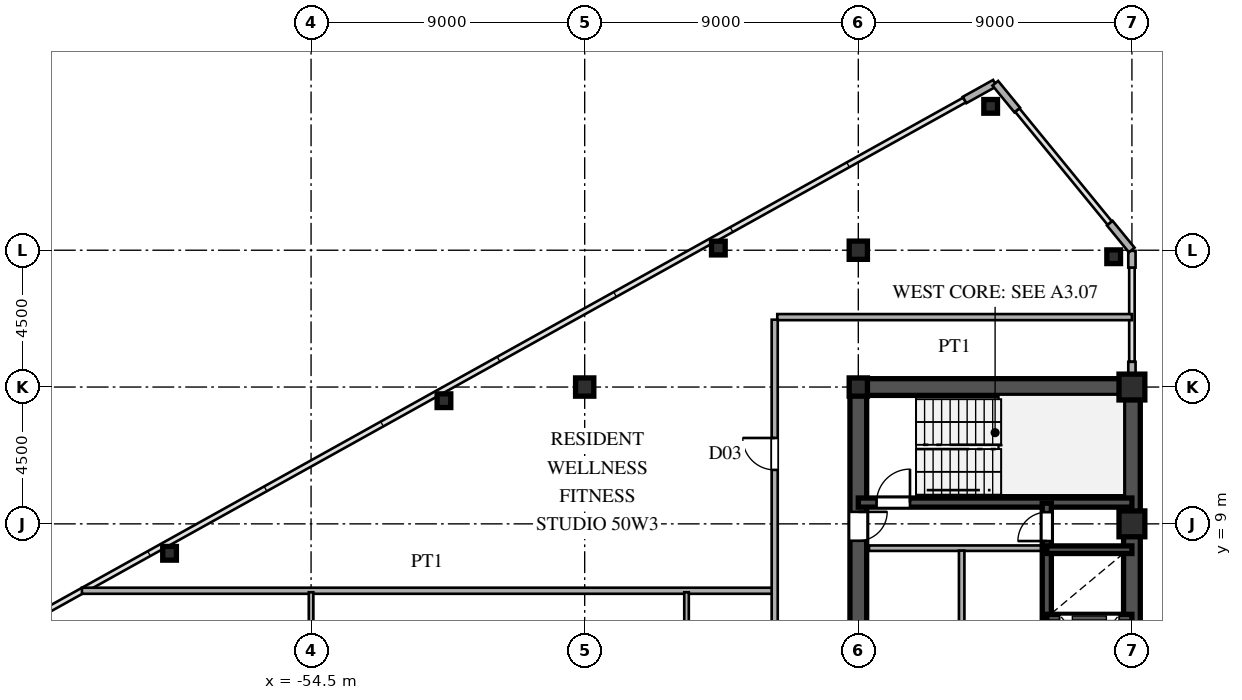
"""IFC4 building model, lengths in metres.
Left out: names, types, materials, properties, quantities, classifications, styles, units other than length and angle.
Written with IfcOpenShell. Run it as: python <this file> out.ifc"""

import sys

from ifc_helpers import new_model, si_unit, direction, frame, frame_2d, origin, origin_2d, place, context, subcontext, project, spatial, rectangle, hollow_rectangle, i_section, extrude, source, transform, mapped, element, fill, save


model = new_model("IFC4")
c1 = context("Model", 3, precision=1e-05, world=origin(), true_north=direction((0.0, 1.0)))
c2 = subcontext(c1, "Body", "Model", "MODEL_VIEW")
j1 = project(units=[si_unit("LENGTHUNIT", "METRE"), si_unit("PLANEANGLEUNIT", "RADIAN")], contexts=[c1])
p1 = place(None, origin())
s1 = spatial("IfcSite", under=j1, at=p1, CompositionType="ELEMENT")
p2 = place(p1, origin())
s2 = spatial("IfcBuilding", under=s1, at=p2, CompositionType="ELEMENT")
p3 = place(p2, frame((0.0, 0.0, 188.7)))
s3 = spatial("IfcBuildingStorey", under=s2, at=p3, CompositionType="ELEMENT", Elevation=188.7)
m1 = source(origin(), c2, "Body", "SweptSolid", [
    extrude(hollow_rectangle(XDim=0.85, YDim=0.85, WallThickness=0.036, at=origin_2d()), origin(), (0.0, 0.0, 1.0), 3.6),
])
for number, where, z_axis, x_axis in (
    (1, (-27.5, 9.0, 0.0), (0.0, 0.0, 1.0), (1.0, 0.0, 0.0)),
    (2, (-27.5, 13.5, 0.0), (0.0, 0.0, 1.0), (1.0, 0.0, 0.0)),
):
    element("IfcColumn", number, at=place(p3, frame(where, z_axis=z_axis, x_axis=x_axis)), inside=s3, PredefinedType="COLUMN", context=c2, shape_type="MappedRepresentation", body=[
        mapped(m1, transform((0.0, 0.0, 0.0), scale=1.0)),
    ])
m2 = source(origin(), c2, "Body", "SweptSolid", [
    extrude(i_section(OverallWidth=0.6, OverallDepth=0.6, WebThickness=0.025, FlangeThickness=0.04, at=origin_2d()), origin(), (0.0, 0.0, 1.0), 3.6),
])
for number, where, z_axis, x_axis in (
    (3, (-36.5, 13.5, 0.0), (0.0, 0.0, 1.0), (1.0, 0.0, 0.0)),
    (4, (-36.5, 18.0, 0.0), (0.0, 0.0, 1.0), (1.0, 0.0, 0.0)),
    (5, (-45.5, 13.5, 0.0), (0.0, 0.0, 1.0), (1.0, 0.0, 0.0)),
):
    element("IfcColumn", number, at=place(p3, frame(where, z_axis=z_axis, x_axis=x_axis)), inside=s3, PredefinedType="COLUMN", context=c2, shape_type="MappedRepresentation", body=[
        mapped(m2, transform((0.0, 0.0, 0.0), scale=1.0)),
    ])
m3 = source(origin(), c2, "Body", "SweptSolid", [
    extrude(hollow_rectangle(XDim=0.45, YDim=0.45, WallThickness=0.018, at=origin_2d()), origin(), (0.0, 0.0, 1.0), 3.6),
])
for number, where, z_axis, x_axis in (
    (6, (-28.1, 17.786, 0.0), (0.0, 0.0, 1.0), (1.0, 0.0, 0.0)),
    (7, (-32.147, 22.732, 0.0), (0.0, 0.0, 1.0), (1.0, 0.0, 0.0)),
    (8, (-41.104, 18.071, 0.0), (0.0, 0.0, 1.0), (1.0, 0.0, 0.0)),
    (9, (-50.129, 13.051, 0.0), (0.0, 0.0, 1.0), (1.0, 0.0, 0.0)),
    (10, (-59.155, 8.031, 0.0), (0.0, 0.0, 1.0), (1.0, 0.0, 0.0)),
):
    element("IfcColumn", number, at=place(p3, frame(where, z_axis=z_axis, x_axis=x_axis)), inside=s3, PredefinedType="COLUMN", context=c2, shape_type="MappedRepresentation", body=[
        mapped(m3, transform((0.0, 0.0, 0.0), scale=1.0)),
    ])
p4 = place(p3, frame((-27.5, 13.78, 0.0), z_axis=(0.0, 0.0, 1.0), x_axis=(0.0, 1.0, 0.0)))
e11 = element("IfcWall", 11, at=p4, inside=s3, PredefinedType="SOLIDWALL", context=c2, shape_type="SweptSolid", body=[
    extrude(rectangle(XDim=0.55, YDim=0.24, at=frame_2d((0.275, 0.0))), origin(), (0.0, 0.0, 1.0), 2.88),
])
p5 = place(p3, frame((-27.5, 17.43, 0.0), z_axis=(0.0, 0.0, 1.0), x_axis=(0.0, 1.0, 0.0)))
e12 = element("IfcWall", 12, at=p5, inside=s3, PredefinedType="SOLIDWALL", context=c2, shape_type="SweptSolid", body=[
    extrude(rectangle(XDim=0.55, YDim=0.24, at=frame_2d((0.275, 0.0))), origin(), (0.0, 0.0, 1.0), 3.38),
])
for number, where, z_axis, x_axis in (
    (13, (-27.506, 18.008, 0.0), (0.0, 0.0, 1.0), (-0.633, 0.774, 0.0)),
    (14, (-31.272, 22.61, 0.0), (0.0, 0.0, 1.0), (-0.633, 0.774, 0.0)),
):
    element("IfcWall", number, at=place(p3, frame(where, z_axis=z_axis, x_axis=x_axis)), inside=s3, PredefinedType="SOLIDWALL", context=c2, shape_type="SweptSolid", body=[
        extrude(rectangle(XDim=1.14, YDim=0.24, at=frame_2d((0.57, 0.0))), origin(), (0.0, 0.0, 1.0), 3.38),
    ])
p6 = place(p3, frame((-32.009, 23.495, 0.0), z_axis=(0.0, 0.0, 1.0), x_axis=(-0.87385402111, -0.486188389196, 0.0)))
e15 = element("IfcWall", 15, at=p6, inside=s3, PredefinedType="SOLIDWALL", context=c2, shape_type="SweptSolid", body=[
    extrude(rectangle(XDim=1.14, YDim=0.24, at=frame_2d((0.57, 0.0))), origin(), (0.0, 0.0, 1.0), 3.38),
])
p7 = place(p3, frame((-27.5, 1.3, 0.0), z_axis=(0.0, 0.0, 1.0), x_axis=(0.0, 1.0, 0.0)))
e16 = element("IfcWall", 16, at=p7, inside=s3, PredefinedType="SHEAR", context=c2, shape_type="SweptSolid", body=[
    extrude(rectangle(XDim=12.2, YDim=0.55, at=frame_2d((6.1, 0.0))), origin(), (0.0, 0.0, 1.0), 3.38),
])
p8 = place(p3, frame((-36.5, 13.5, 0.0), z_axis=(0.0, 0.0, 1.0), x_axis=(1.0, 0.0, 0.0)))
e17 = element("IfcWall", 17, at=p8, inside=s3, PredefinedType="SHEAR", context=c2, shape_type="SweptSolid", body=[
    extrude(rectangle(XDim=9.0, YDim=0.55, at=frame_2d((4.5, 0.0))), origin(), (0.0, 0.0, 1.0), 3.38),
])
p9 = place(p3, frame((-36.5, 8.2, 0.0), z_axis=(0.0, 0.0, 1.0), x_axis=(0.0, 1.0, 0.0)))
e18 = element("IfcWall", 18, at=p9, inside=s3, PredefinedType="SHEAR", context=c2, shape_type="SweptSolid", body=[
    extrude(rectangle(XDim=5.45, YDim=0.55, at=frame_2d((2.725, 0.0))), origin(), (0.0, 0.0, 1.0), 3.38),
])
p10 = place(p9, frame((0.245, 0.0, 0.0)))
e19 = element("IfcOpeningElement", 19, at=p10, cuts=e18, PredefinedType="OPENING", context=c2, shape_type="SweptSolid", body=[
    extrude(rectangle(XDim=0.95, YDim=2.15, at=frame_2d((0.475, 1.075))), frame((0.0, 0.285, 0.0), z_axis=(0.0, -1.0, 0.0), x_axis=(1.0, 0.0, 0.0)), (0.0, 0.0, 1.0), 0.57),
])
p11 = place(p3, frame((-36.5, 1.3, 0.0), z_axis=(0.0, 0.0, 1.0), x_axis=(0.0, 1.0, 0.0)))
e20 = element("IfcWall", 20, at=p11, inside=s3, PredefinedType="SHEAR", context=c2, shape_type="SweptSolid", body=[
    extrude(rectangle(XDim=6.9, YDim=0.55, at=frame_2d((3.45, 0.0))), origin(), (0.0, 0.0, 1.0), 3.38),
])
p12 = place(p11, frame((2.975, 0.0, 0.0)))
e21 = element("IfcOpeningElement", 21, at=p12, cuts=e20, PredefinedType="OPENING", context=c2, shape_type="SweptSolid", body=[
    extrude(rectangle(XDim=0.95, YDim=2.15, at=frame_2d((0.475, 1.075))), frame((0.0, 0.285, 0.0), z_axis=(0.0, -1.0, 0.0), x_axis=(1.0, 0.0, 0.0)), (0.0, 0.0, 1.0), 0.57),
])
p13 = place(p3, frame((-36.5, 9.7, 0.0), z_axis=(0.0, 0.0, 1.0), x_axis=(1.0, 0.0, 0.0)))
e22 = element("IfcWall", 22, at=p13, inside=s3, PredefinedType="SHEAR", context=c2, shape_type="SweptSolid", body=[
    extrude(rectangle(XDim=9.0, YDim=0.3, at=frame_2d((4.5, 0.0))), origin(), (0.0, 0.0, 1.0), 3.38),
])
p14 = place(p13, frame((0.6, 0.0, 0.0)))
e23 = element("IfcOpeningElement", 23, at=p14, cuts=e22, PredefinedType="OPENING", context=c2, shape_type="SweptSolid", body=[
    extrude(rectangle(XDim=1.1, YDim=2.2, at=frame_2d((0.55, 1.1))), frame((0.0, 0.16, 0.0), z_axis=(0.0, -1.0, 0.0), x_axis=(1.0, 0.0, 0.0)), (0.0, 0.0, 1.0), 0.32),
])
for number, where, z_axis, x_axis in (
    (24, (-30.3, 5.9, 0.0), (0.0, 0.0, 1.0), (1.0, 0.0, 0.0)),
    (25, (-30.3, 8.15, 0.0), (0.0, 0.0, 1.0), (1.0, 0.0, 0.0)),
):
    element("IfcWall", number, at=place(p3, frame(where, z_axis=z_axis, x_axis=x_axis)), inside=s3, PredefinedType="SHEAR", context=c2, shape_type="SweptSolid", body=[
        extrude(rectangle(XDim=2.8, YDim=0.25, at=frame_2d((1.4, 0.0))), origin(), (0.0, 0.0, 1.0), 3.38),
    ])
p15 = place(p3, frame((-30.3, 3.6, 0.0), z_axis=(0.0, 0.0, 1.0), x_axis=(0.0, 1.0, 0.0)))
e26 = element("IfcWall", 26, at=p15, inside=s3, PredefinedType="SHEAR", context=c2, shape_type="SweptSolid", body=[
    extrude(rectangle(XDim=2.3, YDim=0.3, at=frame_2d((1.15, 0.0))), origin(), (0.0, 0.0, 1.0), 3.38),
])
p16 = place(p15, frame((0.6, 0.0, 0.0)))
e27 = element("IfcOpeningElement", 27, at=p16, cuts=e26, PredefinedType="OPENING", context=c2, shape_type="SweptSolid", body=[
    extrude(rectangle(XDim=1.1, YDim=2.2, at=frame_2d((0.55, 1.1))), frame((0.0, 0.16, 0.0), z_axis=(0.0, -1.0, 0.0), x_axis=(1.0, 0.0, 0.0)), (0.0, 0.0, 1.0), 0.32),
])
p17 = place(p3, frame((-30.3, 5.9, 0.0), z_axis=(0.0, 0.0, 1.0), x_axis=(0.0, 1.0, 0.0)))
e28 = element("IfcWall", 28, at=p17, inside=s3, PredefinedType="SHEAR", context=c2, shape_type="SweptSolid", body=[
    extrude(rectangle(XDim=2.25, YDim=0.3, at=frame_2d((1.125, 0.0))), origin(), (0.0, 0.0, 1.0), 3.38),
])
p18 = place(p3, frame((-30.3, 8.15, 0.0), z_axis=(0.0, 0.0, 1.0), x_axis=(0.0, 1.0, 0.0)))
e29 = element("IfcWall", 29, at=p18, inside=s3, PredefinedType="SHEAR", context=c2, shape_type="SweptSolid", body=[
    extrude(rectangle(XDim=1.53, YDim=0.3, at=frame_2d((0.765, 0.0))), origin(), (0.0, 0.0, 1.0), 3.38),
])
p19 = place(p18, frame((0.285, 0.0, 0.0)))
e30 = element("IfcOpeningElement", 30, at=p19, cuts=e29, PredefinedType="OPENING", context=c2, shape_type="SweptSolid", body=[
    extrude(rectangle(XDim=0.95, YDim=2.15, at=frame_2d((0.475, 1.075))), frame((0.0, 0.16, 0.0), z_axis=(0.0, -1.0, 0.0), x_axis=(1.0, 0.0, 0.0)), (0.0, 0.0, 1.0), 0.32),
])
p20 = place(p3, frame((-36.15, 8.2, 0.0), z_axis=(0.0, 0.0, 1.0), x_axis=(1.0, 0.0, 0.0)))
e31 = element("IfcWall", 31, at=p20, inside=s3, PredefinedType="PARTITIONING", context=c2, shape_type="SweptSolid", body=[
    extrude(rectangle(XDim=5.7, YDim=0.18, at=frame_2d((2.85, 0.0))), origin(), (0.0, 0.0, 1.0), 3.38),
])
p21 = place(p3, frame((-33.1, 1.38, 0.0), z_axis=(0.0, 0.0, 1.0), x_axis=(0.0, 1.0, 0.0)))
e32 = element("IfcWall", 32, at=p21, inside=s3, PredefinedType="PARTITIONING", context=c2, shape_type="SweptSolid", body=[
    extrude(rectangle(XDim=6.74, YDim=0.18, at=frame_2d((3.37, 0.0))), origin(), (0.0, 0.0, 1.0), 3.38),
])
p22 = place(p3, frame((-62.037, 6.8, 0.0), z_axis=(0.0, 0.0, 1.0), x_axis=(1.0, 0.0, 0.0)))
e33 = element("IfcWall", 33, at=p22, inside=s3, PredefinedType="PARTITIONING", context=c2, shape_type="SweptSolid", body=[
    extrude(rectangle(XDim=22.707, YDim=0.2, at=frame_2d((11.354, 0.0))), origin(), (0.0, 0.0, 1.0), 3.38),
])
p23 = place(p3, frame((-39.165, 15.8, 0.0), z_axis=(0.0, 0.0, 1.0), x_axis=(1.0, 0.0, 0.0)))
e34 = element("IfcWall", 34, at=p23, inside=s3, PredefinedType="PARTITIONING", context=c2, shape_type="SweptSolid", body=[
    extrude(rectangle(XDim=11.665, YDim=0.2, at=frame_2d((5.833, 0.0))), origin(), (0.0, 0.0, 1.0), 3.38),
])
p24 = place(p3, frame((-54.5, -6.75, 0.0), z_axis=(0.0, 0.0, 1.0), x_axis=(0.0, 1.0, 0.0)))
e35 = element("IfcWall", 35, at=p24, inside=s3, PredefinedType="PARTITIONING", context=c2, shape_type="SweptSolid", body=[
    extrude(rectangle(XDim=13.5, YDim=0.15, at=frame_2d((6.75, 0.0))), origin(), (0.0, 0.0, 1.0), 2.78),
])
p25 = place(p24, frame((6.275, 0.0, 0.0)))
e36 = element("IfcOpeningElement", 36, at=p25, cuts=e35, PredefinedType="OPENING", context=c2, shape_type="SweptSolid", body=[
    extrude(rectangle(XDim=0.95, YDim=2.15, at=frame_2d((0.475, 1.075))), frame((0.0, 0.085, 0.0), z_axis=(0.0, -1.0, 0.0), x_axis=(1.0, 0.0, 0.0)), (0.0, 0.0, 1.0), 0.17),
])
p26 = place(p3, frame((-42.15, 2.772, 0.0), z_axis=(0.0, 0.0, 1.0), x_axis=(0.0, 1.0, 0.0)))
e37 = element("IfcWall", 37, at=p26, inside=s3, PredefinedType="PARTITIONING", context=c2, shape_type="SweptSolid", body=[
    extrude(rectangle(XDim=3.978, YDim=0.15, at=frame_2d((1.989, 0.0))), origin(), (0.0, 0.0, 1.0), 3.38),
])
p27 = place(p3, frame((-39.25, -15.715, 0.0), z_axis=(0.0, 0.0, 1.0), x_axis=(0.0, 1.0, 0.0)))
e38 = element("IfcWall", 38, at=p27, inside=s3, PredefinedType="PARTITIONING", context=c2, shape_type="SweptSolid", body=[
    extrude(rectangle(XDim=31.43, YDim=0.2, at=frame_2d((15.715, 0.0))), origin(), (0.0, 0.0, 1.0), 3.38),
])
p28 = place(p27, frame((3.89, 0.0, 0.0)))
e39 = element("IfcOpeningElement", 39, at=p28, cuts=e38, PredefinedType="OPENING", context=c2, shape_type="SweptSolid", body=[
    extrude(rectangle(XDim=1.05, YDim=2.25, at=frame_2d((0.525, 1.125))), frame((0.0, 0.11, 0.0), z_axis=(0.0, -1.0, 0.0), x_axis=(1.0, 0.0, 0.0)), (0.0, 0.0, 1.0), 0.22),
])
p29 = place(p27, frame((14.986, 0.0, 0.0)))
e40 = element("IfcOpeningElement", 40, at=p29, cuts=e38, PredefinedType="OPENING", context=c2, shape_type="SweptSolid", body=[
    extrude(rectangle(XDim=1.05, YDim=2.25, at=frame_2d((0.525, 1.125))), frame((0.0, 0.11, 0.0), z_axis=(0.0, -1.0, 0.0), x_axis=(1.0, 0.0, 0.0)), (0.0, 0.0, 1.0), 0.22),
])
p30 = place(p27, frame((26.49, 0.0, 0.0)))
e41 = element("IfcOpeningElement", 41, at=p30, cuts=e38, PredefinedType="OPENING", context=c2, shape_type="SweptSolid", body=[
    extrude(rectangle(XDim=1.05, YDim=2.25, at=frame_2d((0.525, 1.125))), frame((0.0, 0.11, 0.0), z_axis=(0.0, -1.0, 0.0), x_axis=(1.0, 0.0, 0.0)), (0.0, 0.0, 1.0), 0.22),
])
m4 = source(origin(), c2, "Body", "SweptSolid", [
    extrude(rectangle(XDim=0.95, YDim=2.15, at=frame_2d((0.475, 1.075))), frame((0.0, 0.025, 0.0), z_axis=(0.0, -1.0, 0.0), x_axis=(1.0, 0.0, 0.0)), (0.0, 0.0, 1.0), 0.05),
])
p31 = place(p10, frame((0.95, 0.0, 0.0), z_axis=(0.0, 0.0, 1.0), x_axis=(-1.0, 0.0, 0.0)))
e42 = element("IfcDoor", 42, at=p31, inside=s3, OperationType="SINGLE_SWING_RIGHT", PredefinedType="DOOR", context=c2, shape_type="MappedRepresentation", body=[
    mapped(m4, transform((0.0, 0.0, 0.0), scale=1.0)),
])
fill(e19, e42)
m5 = source(origin(), c2, "Body", "SweptSolid", [
    extrude(rectangle(XDim=1.1, YDim=2.2, at=frame_2d((0.55, 1.1))), frame((0.0, 0.025, 0.0), z_axis=(0.0, -1.0, 0.0), x_axis=(1.0, 0.0, 0.0)), (0.0, 0.0, 1.0), 0.05),
])
p32 = place(p14, origin())
e43 = element("IfcDoor", 43, at=p32, inside=s3, OperationType="SINGLE_SWING_RIGHT", PredefinedType="DOOR", context=c2, shape_type="MappedRepresentation", body=[
    mapped(m5, transform((0.0, 0.0, 0.0), scale=1.0)),
])
fill(e23, e43)
p33 = place(p19, origin())
e44 = element("IfcDoor", 44, at=p33, inside=s3, OperationType="SINGLE_SWING_LEFT", PredefinedType="DOOR", context=c2, shape_type="MappedRepresentation", body=[
    mapped(m4, transform((0.0, 0.0, 0.0), scale=1.0)),
])
fill(e30, e44)
m6 = source(origin(), c2, "Body", "SweptSolid", [
    extrude(rectangle(XDim=1.05, YDim=2.25, at=frame_2d((0.525, 1.125))), frame((0.0, 0.025, 0.0), z_axis=(0.0, -1.0, 0.0), x_axis=(1.0, 0.0, 0.0)), (0.0, 0.0, 1.0), 0.05),
])
p34 = place(p30, origin())
e45 = element("IfcDoor", 45, at=p34, inside=s3, OperationType="SINGLE_SWING_RIGHT", PredefinedType="DOOR", context=c2, shape_type="MappedRepresentation", body=[
    mapped(m6, transform((0.0, 0.0, 0.0), scale=1.0)),
])
fill(e41, e45)
save(model, sys.argv[1])
